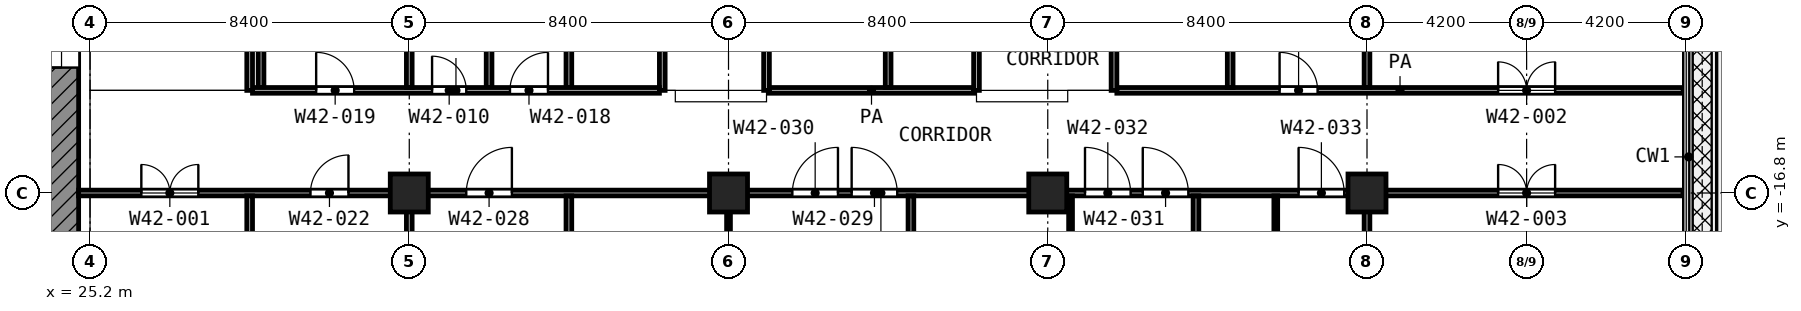
"""IFC4 building model, lengths in metres.
Left out: names, types, materials, properties, quantities, classifications, styles, units other than length and angle.
Written with IfcOpenShell. Run it as: python <this file> out.ifc"""

import sys

from ifc_helpers import new_model, si_unit, direction, frame, frame_2d, origin, origin_2d, place, context, subcontext, project, spatial, rectangle, extrude, element, fill, save


model = new_model("IFC4")
c1 = context("Model", 3, precision=1e-05, world=origin(), true_north=direction((0.0, 1.0)))
c2 = subcontext(c1, "Body", "Model", "MODEL_VIEW")
j1 = project(units=[si_unit("LENGTHUNIT", "METRE"), si_unit("PLANEANGLEUNIT", "RADIAN")], contexts=[c1])
p1 = place(None, origin())
s1 = spatial("IfcSite", under=j1, at=p1, CompositionType="ELEMENT")
p2 = place(p1, origin())
s2 = spatial("IfcBuilding", under=s1, at=p2, CompositionType="ELEMENT")
p3 = place(p2, frame((0.0, 0.0, 204.6)))
s3 = spatial("IfcBuildingStorey", under=s2, at=p3, CompositionType="ELEMENT", Elevation=204.6)
for number, where, z_axis, x_axis in (
    (1, (33.6, -16.8, 0.0), (0.0, 0.0, 1.0), (1.0, 0.0, 0.0)),
    (2, (42.0, -16.8, 0.0), (0.0, 0.0, 1.0), (1.0, 0.0, 0.0)),
    (3, (50.4, -16.8, 0.0), (0.0, 0.0, 1.0), (1.0, 0.0, 0.0)),
    (4, (58.8, -16.8, 0.0), (0.0, 0.0, 1.0), (1.0, 0.0, 0.0)),
):
    element("IfcColumn", number, at=place(p3, frame(where, z_axis=z_axis, x_axis=x_axis)), inside=s3, PredefinedType="COLUMN", context=c2, shape_type="SweptSolid", body=[
        extrude(rectangle(XDim=1.0, YDim=1.0, at=origin_2d()), origin(), (0.0, 0.0, 1.0), 4.2),
    ])
p4 = place(p3, frame((24.45, -24.0, 0.0), z_axis=(0.0, 0.0, 1.0), x_axis=(0.0, 1.0, 0.0)))
e5 = element("IfcWall", 5, at=p4, inside=s3, PredefinedType="SHEAR", context=c2, shape_type="SweptSolid", body=[
    extrude(rectangle(XDim=18.6, YDim=0.9, at=frame_2d((9.3, 0.0))), origin(), (0.0, 0.0, 1.0), 3.6),
])
p5 = place(p4, frame((10.5, 0.0, 0.0)))
e6 = element("IfcOpeningElement", 6, at=p5, cuts=e5, PredefinedType="OPENING", context=c2, shape_type="SweptSolid", body=[
    extrude(rectangle(XDim=1.8, YDim=2.1, at=frame_2d((0.9, 1.05))), frame((0.0, 0.46, 0.0), z_axis=(0.0, -1.0, 0.0), x_axis=(1.0, 0.0, 0.0)), (0.0, 0.0, 1.0), 0.92),
])
p6 = place(p3, frame((42.0, -26.35, 0.0), z_axis=(0.0, 0.0, 1.0), x_axis=(0.0, 1.0, 0.0)))
e7 = element("IfcWall", 7, at=p6, inside=s3, PredefinedType="PARTITIONING", context=c2, shape_type="SweptSolid", body=[
    extrude(rectangle(XDim=9.475, YDim=0.1, at=frame_2d((4.738, 0.0))), origin(), (0.0, 0.0, 1.0), 3.6),
])
p7 = place(p6, frame((4.25, 0.0, 0.0)))
e8 = element("IfcOpeningElement", 8, at=p7, cuts=e7, PredefinedType="OPENING", context=c2, shape_type="SweptSolid", body=[
    extrude(rectangle(XDim=1.0, YDim=2.1, at=frame_2d((0.5, 1.05))), frame((0.0, 0.06, 0.0), z_axis=(0.0, -1.0, 0.0), x_axis=(1.0, 0.0, 0.0)), (0.0, 0.0, 1.0), 0.12),
])
p8 = place(p3, frame((51.0, -26.35, 0.0), z_axis=(0.0, 0.0, 1.0), x_axis=(0.0, 1.0, 0.0)))
e9 = element("IfcWall", 9, at=p8, inside=s3, PredefinedType="PARTITIONING", context=c2, shape_type="SweptSolid", body=[
    extrude(rectangle(XDim=9.475, YDim=0.1, at=frame_2d((4.738, 0.0))), origin(), (0.0, 0.0, 1.0), 3.6),
])
p9 = place(p8, frame((4.25, 0.0, 0.0)))
e10 = element("IfcOpeningElement", 10, at=p9, cuts=e9, PredefinedType="OPENING", context=c2, shape_type="SweptSolid", body=[
    extrude(rectangle(XDim=1.0, YDim=2.1, at=frame_2d((0.5, 1.05))), frame((0.0, 0.06, 0.0), z_axis=(0.0, -1.0, 0.0), x_axis=(1.0, 0.0, 0.0)), (0.0, 0.0, 1.0), 0.12),
])
p10 = place(p3, frame((56.4, -20.1, 0.0), z_axis=(0.0, 0.0, 1.0), x_axis=(0.0, 1.0, 0.0)))
e11 = element("IfcWall", 11, at=p10, inside=s3, PredefinedType="PARTITIONING", context=c2, shape_type="SweptSolid", body=[
    extrude(rectangle(XDim=3.225, YDim=0.1, at=frame_2d((1.613, 0.0))), origin(), (0.0, 0.0, 1.0), 3.6),
])
p11 = place(p3, frame((24.9, -16.8, 0.0), z_axis=(0.0, 0.0, 1.0), x_axis=(1.0, 0.0, 0.0)))
e12 = element("IfcWall", 12, at=p11, inside=s3, PredefinedType="PARTITIONING", context=c2, shape_type="SweptSolid", body=[
    extrude(rectangle(XDim=42.22, YDim=0.15, at=frame_2d((21.11, 0.0))), origin(), (0.0, 0.0, 1.0), 3.6),
])
p12 = place(p11, frame((1.65, 0.0, 0.0)))
e13 = element("IfcOpeningElement", 13, at=p12, cuts=e12, PredefinedType="OPENING", context=c2, shape_type="SweptSolid", body=[
    extrude(rectangle(XDim=1.5, YDim=2.1, at=frame_2d((0.75, 1.05))), frame((0.0, 0.085, 0.0), z_axis=(0.0, -1.0, 0.0), x_axis=(1.0, 0.0, 0.0)), (0.0, 0.0, 1.0), 0.17),
])
p13 = place(p11, frame((6.1, 0.0, 0.0)))
e14 = element("IfcOpeningElement", 14, at=p13, cuts=e12, PredefinedType="OPENING", context=c2, shape_type="SweptSolid", body=[
    extrude(rectangle(XDim=1.0, YDim=2.1, at=frame_2d((0.5, 1.05))), frame((0.0, 0.085, 0.0), z_axis=(0.0, -1.0, 0.0), x_axis=(1.0, 0.0, 0.0)), (0.0, 0.0, 1.0), 0.17),
])
p14 = place(p11, frame((10.2, 0.0, 0.0)))
e15 = element("IfcOpeningElement", 15, at=p14, cuts=e12, PredefinedType="OPENING", context=c2, shape_type="SweptSolid", body=[
    extrude(rectangle(XDim=1.2, YDim=2.1, at=frame_2d((0.6, 1.05))), frame((0.0, 0.085, 0.0), z_axis=(0.0, -1.0, 0.0), x_axis=(1.0, 0.0, 0.0)), (0.0, 0.0, 1.0), 0.17),
])
p15 = place(p11, frame((20.34, 0.0, 0.0)))
e16 = element("IfcOpeningElement", 16, at=p15, cuts=e12, PredefinedType="OPENING", context=c2, shape_type="SweptSolid", body=[
    extrude(rectangle(XDim=1.2, YDim=2.1, at=frame_2d((0.6, 1.05))), frame((0.0, 0.085, 0.0), z_axis=(0.0, -1.0, 0.0), x_axis=(1.0, 0.0, 0.0)), (0.0, 0.0, 1.0), 0.17),
])
p16 = place(p11, frame((18.78, 0.0, 0.0)))
e17 = element("IfcOpeningElement", 17, at=p16, cuts=e12, PredefinedType="OPENING", context=c2, shape_type="SweptSolid", body=[
    extrude(rectangle(XDim=1.2, YDim=2.1, at=frame_2d((0.6, 1.05))), frame((0.0, 0.085, 0.0), z_axis=(0.0, -1.0, 0.0), x_axis=(1.0, 0.0, 0.0)), (0.0, 0.0, 1.0), 0.17),
])
p17 = place(p11, frame((28.0, 0.0, 0.0)))
e18 = element("IfcOpeningElement", 18, at=p17, cuts=e12, PredefinedType="OPENING", context=c2, shape_type="SweptSolid", body=[
    extrude(rectangle(XDim=1.2, YDim=2.1, at=frame_2d((0.6, 1.05))), frame((0.0, 0.085, 0.0), z_axis=(0.0, -1.0, 0.0), x_axis=(1.0, 0.0, 0.0)), (0.0, 0.0, 1.0), 0.17),
])
p18 = place(p11, frame((26.48, 0.0, 0.0)))
e19 = element("IfcOpeningElement", 19, at=p18, cuts=e12, PredefinedType="OPENING", context=c2, shape_type="SweptSolid", body=[
    extrude(rectangle(XDim=1.2, YDim=2.1, at=frame_2d((0.6, 1.05))), frame((0.0, 0.085, 0.0), z_axis=(0.0, -1.0, 0.0), x_axis=(1.0, 0.0, 0.0)), (0.0, 0.0, 1.0), 0.17),
])
p19 = place(p11, frame((32.1, 0.0, 0.0)))
e20 = element("IfcOpeningElement", 20, at=p19, cuts=e12, PredefinedType="OPENING", context=c2, shape_type="SweptSolid", body=[
    extrude(rectangle(XDim=1.2, YDim=2.1, at=frame_2d((0.6, 1.05))), frame((0.0, 0.085, 0.0), z_axis=(0.0, -1.0, 0.0), x_axis=(1.0, 0.0, 0.0)), (0.0, 0.0, 1.0), 0.17),
])
p20 = place(p11, frame((37.35, 0.0, 0.0)))
e21 = element("IfcOpeningElement", 21, at=p20, cuts=e12, PredefinedType="OPENING", context=c2, shape_type="SweptSolid", body=[
    extrude(rectangle(XDim=1.5, YDim=2.1, at=frame_2d((0.75, 1.05))), frame((0.0, 0.085, 0.0), z_axis=(0.0, -1.0, 0.0), x_axis=(1.0, 0.0, 0.0)), (0.0, 0.0, 1.0), 0.17),
])
p21 = place(p3, frame((29.475, -14.1, 0.0), z_axis=(0.0, 0.0, 1.0), x_axis=(1.0, 0.0, 0.0)))
e22 = element("IfcWall", 22, at=p21, inside=s3, PredefinedType="PARTITIONING", context=c2, shape_type="SweptSolid", body=[
    extrude(rectangle(XDim=10.707, YDim=0.15, at=frame_2d((5.354, 0.0))), origin(), (0.0, 0.0, 1.0), 3.6),
])
p22 = place(p21, frame((1.675, 0.0, 0.0)))
e23 = element("IfcOpeningElement", 23, at=p22, cuts=e22, PredefinedType="OPENING", context=c2, shape_type="SweptSolid", body=[
    extrude(rectangle(XDim=1.0, YDim=2.1, at=frame_2d((0.5, 1.05))), frame((0.0, 0.085, 0.0), z_axis=(0.0, -1.0, 0.0), x_axis=(1.0, 0.0, 0.0)), (0.0, 0.0, 1.0), 0.17),
])
p23 = place(p21, frame((4.725, 0.0, 0.0)))
e24 = element("IfcOpeningElement", 24, at=p23, cuts=e22, PredefinedType="OPENING", context=c2, shape_type="SweptSolid", body=[
    extrude(rectangle(XDim=0.9, YDim=2.1, at=frame_2d((0.45, 1.05))), frame((0.0, 0.085, 0.0), z_axis=(0.0, -1.0, 0.0), x_axis=(1.0, 0.0, 0.0)), (0.0, 0.0, 1.0), 0.17),
])
p24 = place(p21, frame((6.775, 0.0, 0.0)))
e25 = element("IfcOpeningElement", 25, at=p24, cuts=e22, PredefinedType="OPENING", context=c2, shape_type="SweptSolid", body=[
    extrude(rectangle(XDim=1.0, YDim=2.1, at=frame_2d((0.5, 1.05))), frame((0.0, 0.085, 0.0), z_axis=(0.0, -1.0, 0.0), x_axis=(1.0, 0.0, 0.0)), (0.0, 0.0, 1.0), 0.17),
])
p25 = place(p3, frame((43.075, -14.1, 0.0), z_axis=(0.0, 0.0, 1.0), x_axis=(1.0, 0.0, 0.0)))
e26 = element("IfcWall", 26, at=p25, inside=s3, PredefinedType="PARTITIONING", context=c2, shape_type="SweptSolid", body=[
    extrude(rectangle(XDim=5.375, YDim=0.15, at=frame_2d((2.688, 0.0))), origin(), (0.0, 0.0, 1.0), 3.6),
])
p26 = place(p3, frame((52.218, -14.1, 0.0), z_axis=(0.0, 0.0, 1.0), x_axis=(1.0, 0.0, 0.0)))
e27 = element("IfcWall", 27, at=p26, inside=s3, PredefinedType="PARTITIONING", context=c2, shape_type="SweptSolid", body=[
    extrude(rectangle(XDim=14.902, YDim=0.15, at=frame_2d((7.451, 0.0))), origin(), (0.0, 0.0, 1.0), 3.6),
])
p27 = place(p26, frame((4.282, 0.0, 0.0)))
e28 = element("IfcOpeningElement", 28, at=p27, cuts=e27, PredefinedType="OPENING", context=c2, shape_type="SweptSolid", body=[
    extrude(rectangle(XDim=1.0, YDim=2.1, at=frame_2d((0.5, 1.05))), frame((0.0, 0.085, 0.0), z_axis=(0.0, -1.0, 0.0), x_axis=(1.0, 0.0, 0.0)), (0.0, 0.0, 1.0), 0.17),
])
p28 = place(p26, frame((10.032, 0.0, 0.0)))
e29 = element("IfcOpeningElement", 29, at=p28, cuts=e27, PredefinedType="OPENING", context=c2, shape_type="SweptSolid", body=[
    extrude(rectangle(XDim=1.5, YDim=2.1, at=frame_2d((0.75, 1.05))), frame((0.0, 0.085, 0.0), z_axis=(0.0, -1.0, 0.0), x_axis=(1.0, 0.0, 0.0)), (0.0, 0.0, 1.0), 0.17),
])
p29 = place(p3, frame((29.4, -31.198, 0.0), z_axis=(0.0, 0.0, 1.0), x_axis=(0.0, 1.0, 0.0)))
e30 = element("IfcWall", 30, at=p29, inside=s3, PredefinedType="PARTITIONING", context=c2, shape_type="SweptSolid", body=[
    extrude(rectangle(XDim=14.323, YDim=0.15, at=frame_2d((7.162, 0.0))), origin(), (0.0, 0.0, 1.0), 3.6),
])
p30 = place(p3, frame((29.4, -14.1, 0.0), z_axis=(0.0, 0.0, 1.0), x_axis=(0.0, 1.0, 0.0)))
e31 = element("IfcWall", 31, at=p30, inside=s3, PredefinedType="PARTITIONING", context=c2, shape_type="SweptSolid", body=[
    extrude(rectangle(XDim=2.998, YDim=0.15, at=frame_2d((1.499, 0.0))), origin(), (0.0, 0.0, 1.0), 3.6),
])
p31 = place(p3, frame((29.7, -14.025, 0.0), z_axis=(0.0, 0.0, 1.0), x_axis=(0.0, 1.0, 0.0)))
e32 = element("IfcWall", 32, at=p31, inside=s3, PredefinedType="PARTITIONING", context=c2, shape_type="SweptSolid", body=[
    extrude(rectangle(XDim=13.945, YDim=0.15, at=frame_2d((6.972, 0.0))), origin(), (0.0, 0.0, 1.0), 2.7),
])
p32 = place(p3, frame((33.6, -31.12, 0.0), z_axis=(0.0, 0.0, 1.0), x_axis=(0.0, 1.0, 0.0)))
e33 = element("IfcWall", 33, at=p32, inside=s3, PredefinedType="PARTITIONING", context=c2, shape_type="SweptSolid", body=[
    extrude(rectangle(XDim=14.245, YDim=0.15, at=frame_2d((7.123, 0.0))), origin(), (0.0, 0.0, 1.0), 3.6),
])
p33 = place(p3, frame((33.6, -14.025, 0.0), z_axis=(0.0, 0.0, 1.0), x_axis=(0.0, 1.0, 0.0)))
e34 = element("IfcWall", 34, at=p33, inside=s3, PredefinedType="PARTITIONING", context=c2, shape_type="SweptSolid", body=[
    extrude(rectangle(XDim=5.125, YDim=0.15, at=frame_2d((2.562, 0.0))), origin(), (0.0, 0.0, 1.0), 3.6),
])
p34 = place(p3, frame((35.7, -14.025, 0.0), z_axis=(0.0, 0.0, 1.0), x_axis=(0.0, 1.0, 0.0)))
e35 = element("IfcWall", 35, at=p34, inside=s3, PredefinedType="PARTITIONING", context=c2, shape_type="SweptSolid", body=[
    extrude(rectangle(XDim=13.945, YDim=0.15, at=frame_2d((6.972, 0.0))), origin(), (0.0, 0.0, 1.0), 2.7),
])
p35 = place(p3, frame((37.8, -31.12, 0.0), z_axis=(0.0, 0.0, 1.0), x_axis=(0.0, 1.0, 0.0)))
e36 = element("IfcWall", 36, at=p35, inside=s3, PredefinedType="PARTITIONING", context=c2, shape_type="SweptSolid", body=[
    extrude(rectangle(XDim=14.245, YDim=0.15, at=frame_2d((7.123, 0.0))), origin(), (0.0, 0.0, 1.0), 3.6),
])
p36 = place(p3, frame((37.8, -14.025, 0.0), z_axis=(0.0, 0.0, 1.0), x_axis=(0.0, 1.0, 0.0)))
e37 = element("IfcWall", 37, at=p36, inside=s3, PredefinedType="PARTITIONING", context=c2, shape_type="SweptSolid", body=[
    extrude(rectangle(XDim=13.945, YDim=0.15, at=frame_2d((6.972, 0.0))), origin(), (0.0, 0.0, 1.0), 2.7),
])
p37 = place(p3, frame((40.257, -14.1, 0.0), z_axis=(0.0, 0.0, 1.0), x_axis=(0.0, 1.0, 0.0)))
e38 = element("IfcWall", 38, at=p37, inside=s3, PredefinedType="PARTITIONING", context=c2, shape_type="SweptSolid", body=[
    extrude(rectangle(XDim=14.02, YDim=0.15, at=frame_2d((7.01, 0.0))), origin(), (0.0, 0.0, 1.0), 2.7),
])
p38 = place(p37, frame((6.374, 0.0, 0.0)))
e39 = element("IfcOpeningElement", 39, at=p38, cuts=e38, PredefinedType="OPENING", context=c2, shape_type="SweptSolid", body=[
    extrude(rectangle(XDim=1.0, YDim=2.1, at=frame_2d((0.5, 1.05))), frame((0.0, 0.085, 0.0), z_axis=(0.0, -1.0, 0.0), x_axis=(1.0, 0.0, 0.0)), (0.0, 0.0, 1.0), 0.17),
])
p39 = place(p3, frame((43.0, -14.1, 0.0), z_axis=(0.0, 0.0, 1.0), x_axis=(0.0, 1.0, 0.0)))
e40 = element("IfcWall", 40, at=p39, inside=s3, PredefinedType="PARTITIONING", context=c2, shape_type="SweptSolid", body=[
    extrude(rectangle(XDim=5.2, YDim=0.15, at=frame_2d((2.6, 0.0))), origin(), (0.0, 0.0, 1.0), 3.6),
])
p40 = place(p39, frame((2.0, 0.0, 0.0)))
e41 = element("IfcOpeningElement", 41, at=p40, cuts=e40, PredefinedType="OPENING", context=c2, shape_type="SweptSolid", body=[
    extrude(rectangle(XDim=1.2, YDim=2.1, at=frame_2d((0.6, 1.05))), frame((0.0, 0.085, 0.0), z_axis=(0.0, -1.0, 0.0), x_axis=(1.0, 0.0, 0.0)), (0.0, 0.0, 1.0), 0.17),
])
p41 = place(p3, frame((46.2, -14.025, 0.0), z_axis=(0.0, 0.0, 1.0), x_axis=(0.0, 1.0, 0.0)))
e42 = element("IfcWall", 42, at=p41, inside=s3, PredefinedType="PARTITIONING", context=c2, shape_type="SweptSolid", body=[
    extrude(rectangle(XDim=5.295, YDim=0.15, at=frame_2d((2.647, 0.0))), origin(), (0.0, 0.0, 1.0), 3.6),
])
p42 = place(p3, frame((46.8, -31.12, 0.0), z_axis=(0.0, 0.0, 1.0), x_axis=(0.0, 1.0, 0.0)))
e43 = element("IfcWall", 43, at=p42, inside=s3, PredefinedType="PARTITIONING", context=c2, shape_type="SweptSolid", body=[
    extrude(rectangle(XDim=14.245, YDim=0.15, at=frame_2d((7.123, 0.0))), origin(), (0.0, 0.0, 1.0), 3.6),
])
p43 = place(p3, frame((48.525, -14.1, 0.0), z_axis=(0.0, 0.0, 1.0), x_axis=(0.0, 1.0, 0.0)))
e44 = element("IfcWall", 44, at=p43, inside=s3, PredefinedType="PARTITIONING", context=c2, shape_type="SweptSolid", body=[
    extrude(rectangle(XDim=5.37, YDim=0.15, at=frame_2d((2.685, 0.0))), origin(), (0.0, 0.0, 1.0), 3.6),
])
p44 = place(p43, frame((2.185, 0.0, 0.0)))
e45 = element("IfcOpeningElement", 45, at=p44, cuts=e44, PredefinedType="OPENING", context=c2, shape_type="SweptSolid", body=[
    extrude(rectangle(XDim=1.0, YDim=2.1, at=frame_2d((0.5, 1.05))), frame((0.0, 0.085, 0.0), z_axis=(0.0, -1.0, 0.0), x_axis=(1.0, 0.0, 0.0)), (0.0, 0.0, 1.0), 0.17),
])
p45 = place(p3, frame((52.143, -14.1, 0.0), z_axis=(0.0, 0.0, 1.0), x_axis=(0.0, 1.0, 0.0)))
e46 = element("IfcWall", 46, at=p45, inside=s3, PredefinedType="PARTITIONING", context=c2, shape_type="SweptSolid", body=[
    extrude(rectangle(XDim=12.249, YDim=0.15, at=frame_2d((6.125, 0.0))), origin(), (0.0, 0.0, 1.0), 3.6),
])
p46 = place(p45, frame((6.224, 0.0, 0.0)))
e47 = element("IfcOpeningElement", 47, at=p46, cuts=e46, PredefinedType="OPENING", context=c2, shape_type="SweptSolid", body=[
    extrude(rectangle(XDim=1.0, YDim=2.1, at=frame_2d((0.5, 1.05))), frame((0.0, 0.085, 0.0), z_axis=(0.0, -1.0, 0.0), x_axis=(1.0, 0.0, 0.0)), (0.0, 0.0, 1.0), 0.17),
])
p47 = place(p3, frame((54.3, -31.12, 0.0), z_axis=(0.0, 0.0, 1.0), x_axis=(0.0, 1.0, 0.0)))
e48 = element("IfcWall", 48, at=p47, inside=s3, PredefinedType="PARTITIONING", context=c2, shape_type="SweptSolid", body=[
    extrude(rectangle(XDim=14.245, YDim=0.15, at=frame_2d((7.123, 0.0))), origin(), (0.0, 0.0, 1.0), 3.6),
])
p48 = place(p3, frame((55.2, -14.025, 0.0), z_axis=(0.0, 0.0, 1.0), x_axis=(0.0, 1.0, 0.0)))
e49 = element("IfcWall", 49, at=p48, inside=s3, PredefinedType="PARTITIONING", context=c2, shape_type="SweptSolid", body=[
    extrude(rectangle(XDim=13.945, YDim=0.15, at=frame_2d((6.972, 0.0))), origin(), (0.0, 0.0, 1.0), 2.7),
])
p49 = place(p3, frame((58.8, -31.12, 0.0), z_axis=(0.0, 0.0, 1.0), x_axis=(0.0, 1.0, 0.0)))
e50 = element("IfcWall", 50, at=p49, inside=s3, PredefinedType="PARTITIONING", context=c2, shape_type="SweptSolid", body=[
    extrude(rectangle(XDim=14.245, YDim=0.15, at=frame_2d((7.123, 0.0))), origin(), (0.0, 0.0, 1.0), 3.6),
])
p50 = place(p3, frame((58.8, -14.025, 0.0), z_axis=(0.0, 0.0, 1.0), x_axis=(0.0, 1.0, 0.0)))
e51 = element("IfcWall", 51, at=p50, inside=s3, PredefinedType="PARTITIONING", context=c2, shape_type="SweptSolid", body=[
    extrude(rectangle(XDim=13.945, YDim=0.15, at=frame_2d((6.972, 0.0))), origin(), (0.0, 0.0, 1.0), 2.7),
])
p51 = place(p5, origin())
e52 = element("IfcDoor", 52, at=p51, inside=s3, OperationType="DOUBLE_DOOR_SINGLE_SWING", PredefinedType="DOOR", context=c2, shape_type="SweptSolid", body=[
    extrude(rectangle(XDim=1.8, YDim=2.1, at=frame_2d((0.9, 1.05))), frame((0.0, 0.025, 0.0), z_axis=(0.0, -1.0, 0.0), x_axis=(1.0, 0.0, 0.0)), (0.0, 0.0, 1.0), 0.05),
])
fill(e6, e52)
p52 = place(p12, origin())
e53 = element("IfcDoor", 53, at=p52, inside=s3, OperationType="DOUBLE_DOOR_SINGLE_SWING", PredefinedType="DOOR", context=c2, shape_type="SweptSolid", body=[
    extrude(rectangle(XDim=1.5, YDim=2.1, at=frame_2d((0.75, 1.05))), frame((0.0, 0.025, 0.0), z_axis=(0.0, -1.0, 0.0), x_axis=(1.0, 0.0, 0.0)), (0.0, 0.0, 1.0), 0.05),
])
fill(e13, e53)
p53 = place(p22, origin())
e54 = element("IfcDoor", 54, at=p53, inside=s3, OperationType="SINGLE_SWING_LEFT", PredefinedType="DOOR", context=c2, shape_type="SweptSolid", body=[
    extrude(rectangle(XDim=1.0, YDim=2.1, at=frame_2d((0.5, 1.05))), frame((0.0, 0.025, 0.0), z_axis=(0.0, -1.0, 0.0), x_axis=(1.0, 0.0, 0.0)), (0.0, 0.0, 1.0), 0.05),
])
fill(e23, e54)
p54 = place(p27, origin())
e55 = element("IfcDoor", 55, at=p54, inside=s3, OperationType="SINGLE_SWING_LEFT", PredefinedType="DOOR", context=c2, shape_type="SweptSolid", body=[
    extrude(rectangle(XDim=1.0, YDim=2.1, at=frame_2d((0.5, 1.05))), frame((0.0, 0.025, 0.0), z_axis=(0.0, -1.0, 0.0), x_axis=(1.0, 0.0, 0.0)), (0.0, 0.0, 1.0), 0.05),
])
fill(e28, e55)
p55 = place(p28, origin())
e56 = element("IfcDoor", 56, at=p55, inside=s3, OperationType="DOUBLE_DOOR_SINGLE_SWING", PredefinedType="DOOR", context=c2, shape_type="SweptSolid", body=[
    extrude(rectangle(XDim=1.5, YDim=2.1, at=frame_2d((0.75, 1.05))), frame((0.0, 0.025, 0.0), z_axis=(0.0, -1.0, 0.0), x_axis=(1.0, 0.0, 0.0)), (0.0, 0.0, 1.0), 0.05),
])
fill(e29, e56)
p56 = place(p13, origin())
e57 = element("IfcDoor", 57, at=p56, inside=s3, OperationType="SINGLE_SWING_RIGHT", PredefinedType="DOOR", context=c2, shape_type="SweptSolid", body=[
    extrude(rectangle(XDim=1.0, YDim=2.1, at=frame_2d((0.5, 1.05))), frame((0.0, 0.025, 0.0), z_axis=(0.0, -1.0, 0.0), x_axis=(1.0, 0.0, 0.0)), (0.0, 0.0, 1.0), 0.05),
])
fill(e14, e57)
p57 = place(p14, origin())
e58 = element("IfcDoor", 58, at=p57, inside=s3, OperationType="SINGLE_SWING_RIGHT", PredefinedType="DOOR", context=c2, shape_type="SweptSolid", body=[
    extrude(rectangle(XDim=1.2, YDim=2.1, at=frame_2d((0.6, 1.05))), frame((0.0, 0.025, 0.0), z_axis=(0.0, -1.0, 0.0), x_axis=(1.0, 0.0, 0.0)), (0.0, 0.0, 1.0), 0.05),
])
fill(e15, e58)
p58 = place(p15, origin())
e59 = element("IfcDoor", 59, at=p58, inside=s3, OperationType="SINGLE_SWING_LEFT", PredefinedType="DOOR", context=c2, shape_type="SweptSolid", body=[
    extrude(rectangle(XDim=1.2, YDim=2.1, at=frame_2d((0.6, 1.05))), frame((0.0, 0.025, 0.0), z_axis=(0.0, -1.0, 0.0), x_axis=(1.0, 0.0, 0.0)), (0.0, 0.0, 1.0), 0.05),
])
fill(e16, e59)
p59 = place(p16, origin())
e60 = element("IfcDoor", 60, at=p59, inside=s3, OperationType="SINGLE_SWING_RIGHT", PredefinedType="DOOR", context=c2, shape_type="SweptSolid", body=[
    extrude(rectangle(XDim=1.2, YDim=2.1, at=frame_2d((0.6, 1.05))), frame((0.0, 0.025, 0.0), z_axis=(0.0, -1.0, 0.0), x_axis=(1.0, 0.0, 0.0)), (0.0, 0.0, 1.0), 0.05),
])
fill(e17, e60)
p60 = place(p17, origin())
e61 = element("IfcDoor", 61, at=p60, inside=s3, OperationType="SINGLE_SWING_LEFT", PredefinedType="DOOR", context=c2, shape_type="SweptSolid", body=[
    extrude(rectangle(XDim=1.2, YDim=2.1, at=frame_2d((0.6, 1.05))), frame((0.0, 0.025, 0.0), z_axis=(0.0, -1.0, 0.0), x_axis=(1.0, 0.0, 0.0)), (0.0, 0.0, 1.0), 0.05),
])
fill(e18, e61)
p61 = place(p18, origin())
e62 = element("IfcDoor", 62, at=p61, inside=s3, OperationType="SINGLE_SWING_LEFT", PredefinedType="DOOR", context=c2, shape_type="SweptSolid", body=[
    extrude(rectangle(XDim=1.2, YDim=2.1, at=frame_2d((0.6, 1.05))), frame((0.0, 0.025, 0.0), z_axis=(0.0, -1.0, 0.0), x_axis=(1.0, 0.0, 0.0)), (0.0, 0.0, 1.0), 0.05),
])
fill(e19, e62)
p62 = place(p19, origin())
e63 = element("IfcDoor", 63, at=p62, inside=s3, OperationType="SINGLE_SWING_LEFT", PredefinedType="DOOR", context=c2, shape_type="SweptSolid", body=[
    extrude(rectangle(XDim=1.2, YDim=2.1, at=frame_2d((0.6, 1.05))), frame((0.0, 0.025, 0.0), z_axis=(0.0, -1.0, 0.0), x_axis=(1.0, 0.0, 0.0)), (0.0, 0.0, 1.0), 0.05),
])
fill(e20, e63)
p63 = place(p20, origin())
e64 = element("IfcDoor", 64, at=p63, inside=s3, OperationType="DOUBLE_DOOR_SINGLE_SWING", PredefinedType="DOOR", context=c2, shape_type="SweptSolid", body=[
    extrude(rectangle(XDim=1.5, YDim=2.1, at=frame_2d((0.75, 1.05))), frame((0.0, 0.025, 0.0), z_axis=(0.0, -1.0, 0.0), x_axis=(1.0, 0.0, 0.0)), (0.0, 0.0, 1.0), 0.05),
])
fill(e21, e64)
p64 = place(p23, origin())
e65 = element("IfcDoor", 65, at=p64, inside=s3, OperationType="SINGLE_SWING_LEFT", PredefinedType="DOOR", context=c2, shape_type="SweptSolid", body=[
    extrude(rectangle(XDim=0.9, YDim=2.1, at=frame_2d((0.45, 1.05))), frame((0.0, 0.025, 0.0), z_axis=(0.0, -1.0, 0.0), x_axis=(1.0, 0.0, 0.0)), (0.0, 0.0, 1.0), 0.05),
])
fill(e24, e65)
p65 = place(p24, origin())
e66 = element("IfcDoor", 66, at=p65, inside=s3, OperationType="SINGLE_SWING_RIGHT", PredefinedType="DOOR", context=c2, shape_type="SweptSolid", body=[
    extrude(rectangle(XDim=1.0, YDim=2.1, at=frame_2d((0.5, 1.05))), frame((0.0, 0.025, 0.0), z_axis=(0.0, -1.0, 0.0), x_axis=(1.0, 0.0, 0.0)), (0.0, 0.0, 1.0), 0.05),
])
fill(e25, e66)
save(model, sys.argv[1])
